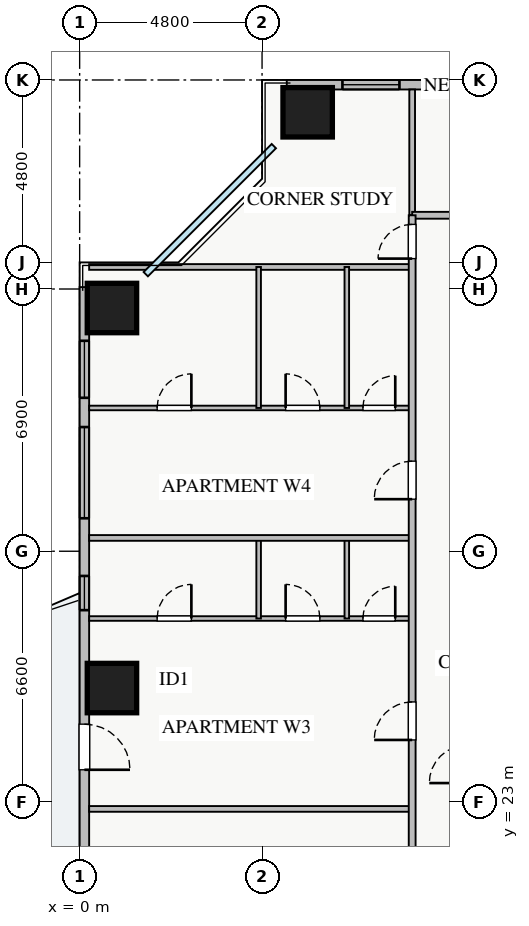
"""IFC4 building model, lengths in metres.
Left out: names, types, materials, properties, quantities, classifications, styles, units other than length and angle.
Written with IfcOpenShell. Run it as: python <this file> out.ifc"""

import sys

from ifc_helpers import new_model, si_unit, direction, frame, frame_2d, origin, origin_2d, place, context, subcontext, project, spatial, rectangle, extrude, source, transform, mapped, element, fill, save


model = new_model("IFC4")
c1 = context("Model", 3, precision=1e-05, world=origin(), true_north=direction((0.0, 1.0)))
c2 = subcontext(c1, "Body", "Model", "MODEL_VIEW")
j1 = project(units=[si_unit("LENGTHUNIT", "METRE"), si_unit("PLANEANGLEUNIT", "RADIAN")], contexts=[c1])
p1 = place(None, origin())
s1 = spatial("IfcSite", under=j1, at=p1, CompositionType="ELEMENT")
p2 = place(p1, origin())
s2 = spatial("IfcBuilding", under=s1, at=p2, CompositionType="ELEMENT")
p3 = place(p2, frame((0.0, 0.0, 63.25)))
s3 = spatial("IfcBuildingStorey", under=s2, at=p3, CompositionType="ELEMENT", Elevation=63.25)
m1 = source(origin(), c2, "Body", "SweptSolid", [
    extrude(rectangle(XDim=1.3, YDim=1.3, at=origin_2d()), origin(), (0.0, 0.0, 1.0), 3.25),
])
for number, where, z_axis, x_axis in (
    (1, (6.0, 41.15, 0.0), (0.0, 0.0, 1.0), (1.0, 0.0, 0.0)),
    (2, (0.85, 36.0, 0.0), (0.0, 0.0, 1.0), (1.0, 0.0, 0.0)),
    (3, (0.85, 26.0, 0.0), (0.0, 0.0, 1.0), (1.0, 0.0, 0.0)),
):
    element("IfcColumn", number, at=place(p3, frame(where, z_axis=z_axis, x_axis=x_axis)), inside=s3, PredefinedType="COLUMN", context=c2, shape_type="MappedRepresentation", body=[
        mapped(m1, transform((0.0, 0.0, 0.0), x_axis=(1.0, 0.0, 0.0), y_axis=(0.0, 1.0, 0.0), z_axis=(0.0, 0.0, 1.0), scale=1.0)),
    ])
p4 = place(p3, frame((5.45, 41.875, 0.0), z_axis=(0.0, 0.0, 1.0), x_axis=(1.0, 0.0, 0.0)))
e4 = element("IfcWall", 4, at=p4, inside=s3, PredefinedType="STANDARD", context=c2, shape_type="SweptSolid", body=[
    extrude(rectangle(XDim=27.1, YDim=0.25, at=frame_2d((13.55, 0.0))), origin(), (0.0, 0.0, 1.0), 2.61),
])
p5 = place(p4, frame((14.4, 0.0, 0.0)))
e5 = element("IfcOpeningElement", 5, at=p5, cuts=e4, PredefinedType="OPENING", context=c2, shape_type="SweptSolid", body=[
    extrude(rectangle(XDim=1.2, YDim=2.1, at=frame_2d((0.6, 1.05))), frame((0.0, 0.135, 0.0), z_axis=(0.0, -1.0, 0.0), x_axis=(1.0, 0.0, 0.0)), (0.0, 0.0, 1.0), 0.27),
])
p6 = place(p4, frame((1.465, 0.0, 0.9)))
e6 = element("IfcOpeningElement", 6, at=p6, cuts=e4, PredefinedType="OPENING", context=c2, shape_type="SweptSolid", body=[
    extrude(rectangle(XDim=1.5, YDim=1.5, at=frame_2d((0.75, 0.75))), frame((0.0, 0.135, 0.0), z_axis=(0.0, -1.0, 0.0), x_axis=(1.0, 0.0, 0.0)), (0.0, 0.0, 1.0), 0.27),
])
p7 = place(p4, frame((9.263, 0.0, 0.9)))
e7 = element("IfcOpeningElement", 7, at=p7, cuts=e4, PredefinedType="OPENING", context=c2, shape_type="SweptSolid", body=[
    extrude(rectangle(XDim=1.8, YDim=1.45, at=frame_2d((0.9, 0.725))), frame((0.0, 0.135, 0.0), z_axis=(0.0, -1.0, 0.0), x_axis=(1.0, 0.0, 0.0)), (0.0, 0.0, 1.0), 0.27),
])
p8 = place(p4, frame((17.93, 0.0, 0.9)))
e8 = element("IfcOpeningElement", 8, at=p8, cuts=e4, PredefinedType="OPENING", context=c2, shape_type="SweptSolid", body=[
    extrude(rectangle(XDim=1.5, YDim=1.5, at=frame_2d((0.75, 0.75))), frame((0.0, 0.135, 0.0), z_axis=(0.0, -1.0, 0.0), x_axis=(1.0, 0.0, 0.0)), (0.0, 0.0, 1.0), 0.27),
])
p9 = place(p4, frame((22.663, 0.0, 0.9)))
e9 = element("IfcOpeningElement", 9, at=p9, cuts=e4, PredefinedType="OPENING", context=c2, shape_type="SweptSolid", body=[
    extrude(rectangle(XDim=2.1, YDim=1.48, at=frame_2d((1.05, 0.74))), frame((0.0, 0.135, 0.0), z_axis=(0.0, -1.0, 0.0), x_axis=(1.0, 0.0, 0.0)), (0.0, 0.0, 1.0), 0.27),
])
p10 = place(p4, frame((4.63, 0.0, 0.9)))
e10 = element("IfcOpeningElement", 10, at=p10, cuts=e4, PredefinedType="OPENING", context=c2, shape_type="SweptSolid", body=[
    extrude(rectangle(XDim=2.4, YDim=1.5, at=frame_2d((1.2, 0.75))), frame((0.0, 0.135, 0.0), z_axis=(0.0, -1.0, 0.0), x_axis=(1.0, 0.0, 0.0)), (0.0, 0.0, 1.0), 0.27),
])
p11 = place(p3, frame((0.125, 9.45, 0.0), z_axis=(0.0, 0.0, 1.0), x_axis=(0.0, 1.0, 0.0)))
e11 = element("IfcWall", 11, at=p11, inside=s3, PredefinedType="STANDARD", context=c2, shape_type="SweptSolid", body=[
    extrude(rectangle(XDim=27.1, YDim=0.25, at=frame_2d((13.55, 0.0))), origin(), (0.0, 0.0, 1.0), 2.61),
])
p12 = place(p11, frame((14.4, 0.0, 0.0)))
e12 = element("IfcOpeningElement", 12, at=p12, cuts=e11, PredefinedType="OPENING", context=c2, shape_type="SweptSolid", body=[
    extrude(rectangle(XDim=1.2, YDim=2.1, at=frame_2d((0.6, 1.05))), frame((0.0, 0.135, 0.0), z_axis=(0.0, -1.0, 0.0), x_axis=(1.0, 0.0, 0.0)), (0.0, 0.0, 1.0), 0.27),
])
p13 = place(p11, frame((1.417, 0.0, 0.9)))
e13 = element("IfcOpeningElement", 13, at=p13, cuts=e11, PredefinedType="OPENING", context=c2, shape_type="SweptSolid", body=[
    extrude(rectangle(XDim=1.2, YDim=1.4, at=frame_2d((0.6, 0.7))), frame((0.0, 0.135, 0.0), z_axis=(0.0, -1.0, 0.0), x_axis=(1.0, 0.0, 0.0)), (0.0, 0.0, 1.0), 0.27),
])
p14 = place(p11, frame((24.188, 0.0, 0.9)))
e14 = element("IfcOpeningElement", 14, at=p14, cuts=e11, PredefinedType="OPENING", context=c2, shape_type="SweptSolid", body=[
    extrude(rectangle(XDim=1.5, YDim=1.5, at=frame_2d((0.75, 0.75))), frame((0.0, 0.135, 0.0), z_axis=(0.0, -1.0, 0.0), x_axis=(1.0, 0.0, 0.0)), (0.0, 0.0, 1.0), 0.27),
])
p15 = place(p11, frame((3.722, 0.0, 0.9)))
e15 = element("IfcOpeningElement", 15, at=p15, cuts=e11, PredefinedType="OPENING", context=c2, shape_type="SweptSolid", body=[
    extrude(rectangle(XDim=2.4, YDim=1.5, at=frame_2d((1.2, 0.75))), frame((0.0, 0.135, 0.0), z_axis=(0.0, -1.0, 0.0), x_axis=(1.0, 0.0, 0.0)), (0.0, 0.0, 1.0), 0.27),
])
p16 = place(p11, frame((21.018, 0.0, 0.9)))
e16 = element("IfcOpeningElement", 16, at=p16, cuts=e11, PredefinedType="OPENING", context=c2, shape_type="SweptSolid", body=[
    extrude(rectangle(XDim=2.4, YDim=1.5, at=frame_2d((1.2, 0.75))), frame((0.0, 0.135, 0.0), z_axis=(0.0, -1.0, 0.0), x_axis=(1.0, 0.0, 0.0)), (0.0, 0.0, 1.0), 0.27),
])
p17 = place(p11, frame((18.6, 0.0, 0.9)))
e17 = element("IfcOpeningElement", 17, at=p17, cuts=e11, PredefinedType="OPENING", context=c2, shape_type="SweptSolid", body=[
    extrude(rectangle(XDim=0.9, YDim=1.2, at=frame_2d((0.45, 0.6))), frame((0.0, 0.135, 0.0), z_axis=(0.0, -1.0, 0.0), x_axis=(1.0, 0.0, 0.0)), (0.0, 0.0, 1.0), 0.27),
])
p18 = place(p3, frame((8.75, 38.44, 0.0), z_axis=(0.0, 0.0, 1.0), x_axis=(0.0, 1.0, 0.0)))
e18 = element("IfcWall", 18, at=p18, inside=s3, PredefinedType="PARTITIONING", context=c2, shape_type="SweptSolid", body=[
    extrude(rectangle(XDim=3.31, YDim=0.15, at=frame_2d((1.655, 0.0))), origin(), (0.0, 0.0, 1.0), 3.07),
])
p19 = place(p3, frame((8.75, 38.44, 0.0), z_axis=(0.0, 0.0, 1.0), x_axis=(1.0, 0.0, 0.0)))
e19 = element("IfcWall", 19, at=p19, inside=s3, PredefinedType="PARTITIONING", context=c2, shape_type="SweptSolid", body=[
    extrude(rectangle(XDim=23.61, YDim=0.18, at=frame_2d((11.805, 0.0))), origin(), (0.0, 0.0, 1.0), 3.07),
])
p20 = place(p19, frame((2.03, 0.0, 0.0)))
e20 = element("IfcOpeningElement", 20, at=p20, cuts=e19, PredefinedType="OPENING", context=c2, shape_type="SweptSolid", body=[
    extrude(rectangle(XDim=1.0, YDim=2.05, at=frame_2d((0.5, 1.025))), frame((0.0, 0.1, 0.0), z_axis=(0.0, -1.0, 0.0), x_axis=(1.0, 0.0, 0.0)), (0.0, 0.0, 1.0), 0.2),
])
p21 = place(p19, frame((8.555, 0.0, 0.0)))
e21 = element("IfcOpeningElement", 21, at=p21, cuts=e19, PredefinedType="OPENING", context=c2, shape_type="SweptSolid", body=[
    extrude(rectangle(XDim=1.0, YDim=2.05, at=frame_2d((0.5, 1.025))), frame((0.0, 0.1, 0.0), z_axis=(0.0, -1.0, 0.0), x_axis=(1.0, 0.0, 0.0)), (0.0, 0.0, 1.0), 0.2),
])
p22 = place(p19, frame((14.88, 0.0, 0.0)))
e22 = element("IfcOpeningElement", 22, at=p22, cuts=e19, PredefinedType="OPENING", context=c2, shape_type="SweptSolid", body=[
    extrude(rectangle(XDim=1.0, YDim=2.05, at=frame_2d((0.5, 1.025))), frame((0.0, 0.1, 0.0), z_axis=(0.0, -1.0, 0.0), x_axis=(1.0, 0.0, 0.0)), (0.0, 0.0, 1.0), 0.2),
])
p23 = place(p19, frame((20.16, 0.0, 0.0)))
e23 = element("IfcOpeningElement", 23, at=p23, cuts=e19, PredefinedType="OPENING", context=c2, shape_type="SweptSolid", body=[
    extrude(rectangle(XDim=1.0, YDim=2.05, at=frame_2d((0.5, 1.025))), frame((0.0, 0.1, 0.0), z_axis=(0.0, -1.0, 0.0), x_axis=(1.0, 0.0, 0.0)), (0.0, 0.0, 1.0), 0.2),
])
p24 = place(p3, frame((0.25, 37.08, 0.0), z_axis=(0.0, 0.0, 1.0), x_axis=(1.0, 0.0, 0.0)))
e24 = element("IfcWall", 24, at=p24, inside=s3, PredefinedType="PARTITIONING", context=c2, shape_type="SweptSolid", body=[
    extrude(rectangle(XDim=8.5, YDim=0.15, at=frame_2d((4.25, 0.0))), origin(), (0.0, 0.0, 1.0), 3.07),
])
p25 = place(p3, frame((0.25, 27.83, 0.0), z_axis=(0.0, 0.0, 1.0), x_axis=(1.0, 0.0, 0.0)))
e25 = element("IfcWall", 25, at=p25, inside=s3, PredefinedType="PLUMBINGWALL", context=c2, shape_type="SweptSolid", body=[
    extrude(rectangle(XDim=8.5, YDim=0.12, at=frame_2d((4.25, 0.0))), origin(), (0.0, 0.0, 1.0), 2.771),
])
p26 = place(p25, frame((1.79, 0.0, 0.0)))
e26 = element("IfcOpeningElement", 26, at=p26, cuts=e25, PredefinedType="OPENING", context=c2, shape_type="SweptSolid", body=[
    extrude(rectangle(XDim=0.9, YDim=2.05, at=frame_2d((0.45, 1.025))), frame((0.0, 0.07, 0.0), z_axis=(0.0, -1.0, 0.0), x_axis=(1.0, 0.0, 0.0)), (0.0, 0.0, 1.0), 0.14),
])
p27 = place(p25, frame((5.17, 0.0, 0.0)))
e27 = element("IfcOpeningElement", 27, at=p27, cuts=e25, PredefinedType="OPENING", context=c2, shape_type="SweptSolid", body=[
    extrude(rectangle(XDim=0.9, YDim=2.05, at=frame_2d((0.45, 1.025))), frame((0.0, 0.07, 0.0), z_axis=(0.0, -1.0, 0.0), x_axis=(1.0, 0.0, 0.0)), (0.0, 0.0, 1.0), 0.14),
])
p28 = place(p25, frame((7.205, 0.0, 0.0)))
e28 = element("IfcOpeningElement", 28, at=p28, cuts=e25, PredefinedType="OPENING", context=c2, shape_type="SweptSolid", body=[
    extrude(rectangle(XDim=0.85, YDim=2.05, at=frame_2d((0.425, 1.025))), frame((0.0, 0.07, 0.0), z_axis=(0.0, -1.0, 0.0), x_axis=(1.0, 0.0, 0.0)), (0.0, 0.0, 1.0), 0.14),
])
for number, where, z_axis, x_axis in (
    (29, (4.71, 27.83, 0.0), (0.0, 0.0, 1.0), (0.0, 1.0, 0.0)),
    (30, (7.03, 27.83, 0.0), (0.0, 0.0, 1.0), (0.0, 1.0, 0.0)),
):
    element("IfcWall", number, at=place(p3, frame(where, z_axis=z_axis, x_axis=x_axis)), inside=s3, PredefinedType="PLUMBINGWALL", context=c2, shape_type="SweptSolid", body=[
        extrude(rectangle(XDim=2.12, YDim=0.12, at=frame_2d((1.06, 0.0))), origin(), (0.0, 0.0, 1.0), 3.07),
    ])
p29 = place(p3, frame((0.25, 22.82, 0.0), z_axis=(0.0, 0.0, 1.0), x_axis=(1.0, 0.0, 0.0)))
e31 = element("IfcWall", 31, at=p29, inside=s3, PredefinedType="PARTITIONING", context=c2, shape_type="SweptSolid", body=[
    extrude(rectangle(XDim=8.5, YDim=0.15, at=frame_2d((4.25, 0.0))), origin(), (0.0, 0.0, 1.0), 3.07),
])
p30 = place(p3, frame((0.25, 33.37, 0.0), z_axis=(0.0, 0.0, 1.0), x_axis=(1.0, 0.0, 0.0)))
e32 = element("IfcWall", 32, at=p30, inside=s3, PredefinedType="PLUMBINGWALL", context=c2, shape_type="SweptSolid", body=[
    extrude(rectangle(XDim=8.5, YDim=0.12, at=frame_2d((4.25, 0.0))), origin(), (0.0, 0.0, 1.0), 3.07),
])
p31 = place(p30, frame((1.79, 0.0, 0.0)))
e33 = element("IfcOpeningElement", 33, at=p31, cuts=e32, PredefinedType="OPENING", context=c2, shape_type="SweptSolid", body=[
    extrude(rectangle(XDim=0.9, YDim=2.05, at=frame_2d((0.45, 1.025))), frame((0.0, 0.07, 0.0), z_axis=(0.0, -1.0, 0.0), x_axis=(1.0, 0.0, 0.0)), (0.0, 0.0, 1.0), 0.14),
])
p32 = place(p30, frame((5.17, 0.0, 0.0)))
e34 = element("IfcOpeningElement", 34, at=p32, cuts=e32, PredefinedType="OPENING", context=c2, shape_type="SweptSolid", body=[
    extrude(rectangle(XDim=0.9, YDim=2.05, at=frame_2d((0.45, 1.025))), frame((0.0, 0.07, 0.0), z_axis=(0.0, -1.0, 0.0), x_axis=(1.0, 0.0, 0.0)), (0.0, 0.0, 1.0), 0.14),
])
p33 = place(p30, frame((7.205, 0.0, 0.0)))
e35 = element("IfcOpeningElement", 35, at=p33, cuts=e32, PredefinedType="OPENING", context=c2, shape_type="SweptSolid", body=[
    extrude(rectangle(XDim=0.85, YDim=2.05, at=frame_2d((0.425, 1.025))), frame((0.0, 0.07, 0.0), z_axis=(0.0, -1.0, 0.0), x_axis=(1.0, 0.0, 0.0)), (0.0, 0.0, 1.0), 0.14),
])
for number, where, z_axis, x_axis in (
    (36, (4.71, 33.37, 0.0), (0.0, 0.0, 1.0), (0.0, 1.0, 0.0)),
    (37, (7.03, 33.37, 0.0), (0.0, 0.0, 1.0), (0.0, 1.0, 0.0)),
):
    element("IfcWall", number, at=place(p3, frame(where, z_axis=z_axis, x_axis=x_axis)), inside=s3, PredefinedType="PLUMBINGWALL", context=c2, shape_type="SweptSolid", body=[
        extrude(rectangle(XDim=3.71, YDim=0.12, at=frame_2d((1.855, 0.0))), origin(), (0.0, 0.0, 1.0), 3.07),
    ])
p34 = place(p3, frame((0.25, 29.95, 0.0), z_axis=(0.0, 0.0, 1.0), x_axis=(1.0, 0.0, 0.0)))
e38 = element("IfcWall", 38, at=p34, inside=s3, PredefinedType="PARTITIONING", context=c2, shape_type="SweptSolid", body=[
    extrude(rectangle(XDim=8.5, YDim=0.15, at=frame_2d((4.25, 0.0))), origin(), (0.0, 0.0, 1.0), 3.07),
])
p35 = place(p3, frame((8.75, 7.21, 0.0), z_axis=(0.0, 0.0, 1.0), x_axis=(0.0, 1.0, 0.0)))
e39 = element("IfcWall", 39, at=p35, inside=s3, PredefinedType="PARTITIONING", context=c2, shape_type="SweptSolid", body=[
    extrude(rectangle(XDim=31.23, YDim=0.18, at=frame_2d((15.615, 0.0))), origin(), (0.0, 0.0, 1.0), 3.07),
])
p36 = place(p35, frame((30.09, 0.0, 0.0)))
e40 = element("IfcOpeningElement", 40, at=p36, cuts=e39, PredefinedType="OPENING", context=c2, shape_type="SweptSolid", body=[
    extrude(rectangle(XDim=0.9, YDim=2.05, at=frame_2d((0.45, 1.025))), frame((0.0, 0.1, 0.0), z_axis=(0.0, -1.0, 0.0), x_axis=(1.0, 0.0, 0.0)), (0.0, 0.0, 1.0), 0.2),
])
p37 = place(p35, frame((0.24, 0.0, 0.0)))
e41 = element("IfcOpeningElement", 41, at=p37, cuts=e39, PredefinedType="OPENING", context=c2, shape_type="SweptSolid", body=[
    extrude(rectangle(XDim=0.9, YDim=2.05, at=frame_2d((0.45, 1.025))), frame((0.0, 0.1, 0.0), z_axis=(0.0, -1.0, 0.0), x_axis=(1.0, 0.0, 0.0)), (0.0, 0.0, 1.0), 0.2),
])
p38 = place(p35, frame((2.555, 0.0, 0.0)))
e42 = element("IfcOpeningElement", 42, at=p38, cuts=e39, PredefinedType="OPENING", context=c2, shape_type="SweptSolid", body=[
    extrude(rectangle(XDim=1.0, YDim=2.05, at=frame_2d((0.5, 1.025))), frame((0.0, 0.1, 0.0), z_axis=(0.0, -1.0, 0.0), x_axis=(1.0, 0.0, 0.0)), (0.0, 0.0, 1.0), 0.2),
])
p39 = place(p35, frame((11.91, 0.0, 0.0)))
e43 = element("IfcOpeningElement", 43, at=p39, cuts=e39, PredefinedType="OPENING", context=c2, shape_type="SweptSolid", body=[
    extrude(rectangle(XDim=1.0, YDim=2.05, at=frame_2d((0.5, 1.025))), frame((0.0, 0.1, 0.0), z_axis=(0.0, -1.0, 0.0), x_axis=(1.0, 0.0, 0.0)), (0.0, 0.0, 1.0), 0.2),
])
p40 = place(p35, frame((17.425, 0.0, 0.0)))
e44 = element("IfcOpeningElement", 44, at=p40, cuts=e39, PredefinedType="OPENING", context=c2, shape_type="SweptSolid", body=[
    extrude(rectangle(XDim=1.0, YDim=2.05, at=frame_2d((0.5, 1.025))), frame((0.0, 0.1, 0.0), z_axis=(0.0, -1.0, 0.0), x_axis=(1.0, 0.0, 0.0)), (0.0, 0.0, 1.0), 0.2),
])
p41 = place(p35, frame((23.76, 0.0, 0.0)))
e45 = element("IfcOpeningElement", 45, at=p41, cuts=e39, PredefinedType="OPENING", context=c2, shape_type="SweptSolid", body=[
    extrude(rectangle(XDim=1.0, YDim=2.05, at=frame_2d((0.5, 1.025))), frame((0.0, 0.1, 0.0), z_axis=(0.0, -1.0, 0.0), x_axis=(1.0, 0.0, 0.0)), (0.0, 0.0, 1.0), 0.2),
])
m2 = source(origin(), c2, "Body", "SweptSolid", [
    extrude(rectangle(XDim=1.5, YDim=1.5, at=frame_2d((0.75, 0.75))), frame((0.0, 0.03, 0.0), z_axis=(0.0, -1.0, 0.0), x_axis=(1.0, 0.0, 0.0)), (0.0, 0.0, 1.0), 0.06),
])
p42 = place(p6, origin())
e46 = element("IfcWindow", 46, at=p42, inside=s3, PartitioningType="TRIPLE_PANEL_VERTICAL", PredefinedType="WINDOW", context=c2, shape_type="MappedRepresentation", body=[
    mapped(m2, transform((0.0, 0.0, 0.0), x_axis=(1.0, 0.0, 0.0), y_axis=(0.0, 1.0, 0.0), z_axis=(0.0, 0.0, 1.0), scale=1.0)),
])
fill(e6, e46)
m3 = source(origin(), c2, "Body", "SweptSolid", [
    extrude(rectangle(XDim=1.2, YDim=2.1, at=frame_2d((0.6, 1.05))), frame((0.0, 0.025, 0.0), z_axis=(0.0, -1.0, 0.0), x_axis=(1.0, 0.0, 0.0)), (0.0, 0.0, 1.0), 0.05),
])
p43 = place(p12, frame((1.2, 0.0, 0.0), z_axis=(0.0, 0.0, 1.0), x_axis=(-1.0, 0.0, 0.0)))
e47 = element("IfcDoor", 47, at=p43, inside=s3, OperationType="SINGLE_SWING_LEFT", PredefinedType="DOOR", context=c2, shape_type="MappedRepresentation", body=[
    mapped(m3, transform((0.0, 0.0, 0.0), x_axis=(1.0, 0.0, 0.0), y_axis=(0.0, 1.0, 0.0), z_axis=(0.0, 0.0, 1.0), scale=1.0)),
])
fill(e12, e47)
p44 = place(p14, origin())
e48 = element("IfcWindow", 48, at=p44, inside=s3, PartitioningType="TRIPLE_PANEL_VERTICAL", PredefinedType="WINDOW", context=c2, shape_type="MappedRepresentation", body=[
    mapped(m2, transform((0.0, 0.0, 0.0), x_axis=(1.0, 0.0, 0.0), y_axis=(0.0, 1.0, 0.0), z_axis=(0.0, 0.0, 1.0), scale=1.0)),
])
fill(e14, e48)
m4 = source(origin(), c2, "Body", "SweptSolid", [
    extrude(rectangle(XDim=0.9, YDim=2.05, at=frame_2d((0.45, 1.025))), frame((0.0, 0.025, 0.0), z_axis=(0.0, -1.0, 0.0), x_axis=(1.0, 0.0, 0.0)), (0.0, 0.0, 1.0), 0.05),
])
p45 = place(p26, origin())
e49 = element("IfcDoor", 49, at=p45, inside=s3, OperationType="SINGLE_SWING_RIGHT", PredefinedType="DOOR", context=c2, shape_type="MappedRepresentation", body=[
    mapped(m4, transform((0.0, 0.0, 0.0), x_axis=(1.0, 0.0, 0.0), y_axis=(0.0, 1.0, 0.0), z_axis=(0.0, 0.0, 1.0), scale=1.0)),
])
fill(e26, e49)
p46 = place(p27, origin())
e50 = element("IfcDoor", 50, at=p46, inside=s3, OperationType="SINGLE_SWING_LEFT", PredefinedType="DOOR", context=c2, shape_type="MappedRepresentation", body=[
    mapped(m4, transform((0.0, 0.0, 0.0), x_axis=(1.0, 0.0, 0.0), y_axis=(0.0, 1.0, 0.0), z_axis=(0.0, 0.0, 1.0), scale=1.0)),
])
fill(e27, e50)
m5 = source(origin(), c2, "Body", "SweptSolid", [
    extrude(rectangle(XDim=0.85, YDim=2.05, at=frame_2d((0.425, 1.025))), frame((0.0, 0.025, 0.0), z_axis=(0.0, -1.0, 0.0), x_axis=(1.0, 0.0, 0.0)), (0.0, 0.0, 1.0), 0.05),
])
p47 = place(p28, origin())
e51 = element("IfcDoor", 51, at=p47, inside=s3, OperationType="SINGLE_SWING_RIGHT", PredefinedType="DOOR", context=c2, shape_type="MappedRepresentation", body=[
    mapped(m5, transform((0.0, 0.0, 0.0), x_axis=(1.0, 0.0, 0.0), y_axis=(0.0, 1.0, 0.0), z_axis=(0.0, 0.0, 1.0), scale=1.0)),
])
fill(e28, e51)
p48 = place(p31, origin())
e52 = element("IfcDoor", 52, at=p48, inside=s3, OperationType="SINGLE_SWING_RIGHT", PredefinedType="DOOR", context=c2, shape_type="MappedRepresentation", body=[
    mapped(m4, transform((0.0, 0.0, 0.0), x_axis=(1.0, 0.0, 0.0), y_axis=(0.0, 1.0, 0.0), z_axis=(0.0, 0.0, 1.0), scale=1.0)),
])
fill(e33, e52)
p49 = place(p32, origin())
e53 = element("IfcDoor", 53, at=p49, inside=s3, OperationType="SINGLE_SWING_LEFT", PredefinedType="DOOR", context=c2, shape_type="MappedRepresentation", body=[
    mapped(m4, transform((0.0, 0.0, 0.0), x_axis=(1.0, 0.0, 0.0), y_axis=(0.0, 1.0, 0.0), z_axis=(0.0, 0.0, 1.0), scale=1.0)),
])
fill(e34, e53)
p50 = place(p33, origin())
e54 = element("IfcDoor", 54, at=p50, inside=s3, OperationType="SINGLE_SWING_RIGHT", PredefinedType="DOOR", context=c2, shape_type="MappedRepresentation", body=[
    mapped(m5, transform((0.0, 0.0, 0.0), x_axis=(1.0, 0.0, 0.0), y_axis=(0.0, 1.0, 0.0), z_axis=(0.0, 0.0, 1.0), scale=1.0)),
])
fill(e35, e54)
p51 = place(p36, origin())
e55 = element("IfcDoor", 55, at=p51, inside=s3, OperationType="SINGLE_SWING_LEFT", PredefinedType="DOOR", context=c2, shape_type="MappedRepresentation", body=[
    mapped(m4, transform((0.0, 0.0, 0.0), x_axis=(1.0, 0.0, 0.0), y_axis=(0.0, 1.0, 0.0), z_axis=(0.0, 0.0, 1.0), scale=1.0)),
])
fill(e40, e55)
m6 = source(origin(), c2, "Body", "SweptSolid", [
    extrude(rectangle(XDim=1.0, YDim=2.05, at=frame_2d((0.5, 1.025))), frame((0.0, 0.025, 0.0), z_axis=(0.0, -1.0, 0.0), x_axis=(1.0, 0.0, 0.0)), (0.0, 0.0, 1.0), 0.05),
])
p52 = place(p40, origin())
e56 = element("IfcDoor", 56, at=p52, inside=s3, OperationType="SINGLE_SWING_LEFT", PredefinedType="DOOR", context=c2, shape_type="MappedRepresentation", body=[
    mapped(m6, transform((0.0, 0.0, 0.0), x_axis=(1.0, 0.0, 0.0), y_axis=(0.0, 1.0, 0.0), z_axis=(0.0, 0.0, 1.0), scale=1.0)),
])
fill(e44, e56)
p53 = place(p41, origin())
e57 = element("IfcDoor", 57, at=p53, inside=s3, OperationType="SINGLE_SWING_LEFT", PredefinedType="DOOR", context=c2, shape_type="MappedRepresentation", body=[
    mapped(m6, transform((0.0, 0.0, 0.0), x_axis=(1.0, 0.0, 0.0), y_axis=(0.0, 1.0, 0.0), z_axis=(0.0, 0.0, 1.0), scale=1.0)),
])
fill(e45, e57)
m7 = source(origin(), c2, "Body", "SweptSolid", [
    extrude(rectangle(XDim=2.4, YDim=1.5, at=frame_2d((1.2, 0.75))), frame((0.0, 0.03, 0.0), z_axis=(0.0, -1.0, 0.0), x_axis=(1.0, 0.0, 0.0)), (0.0, 0.0, 1.0), 0.06),
])
p54 = place(p16, origin())
e58 = element("IfcWindow", 58, at=p54, inside=s3, PartitioningType="TRIPLE_PANEL_VERTICAL", PredefinedType="WINDOW", context=c2, shape_type="MappedRepresentation", body=[
    mapped(m7, transform((0.0, 0.0, 0.0), x_axis=(1.0, 0.0, 0.0), y_axis=(0.0, 1.0, 0.0), z_axis=(0.0, 0.0, 1.0), scale=1.0)),
])
fill(e16, e58)
m8 = source(origin(), c2, "Body", "SweptSolid", [
    extrude(rectangle(XDim=0.9, YDim=1.2, at=frame_2d((0.45, 0.6))), frame((0.0, 0.03, 0.0), z_axis=(0.0, -1.0, 0.0), x_axis=(1.0, 0.0, 0.0)), (0.0, 0.0, 1.0), 0.06),
])
p55 = place(p17, origin())
e59 = element("IfcWindow", 59, at=p55, inside=s3, PartitioningType="SINGLE_PANEL", PredefinedType="WINDOW", context=c2, shape_type="MappedRepresentation", body=[
    mapped(m8, transform((0.0, 0.0, 0.0), x_axis=(1.0, 0.0, 0.0), y_axis=(0.0, 1.0, 0.0), z_axis=(0.0, 0.0, 1.0), scale=1.0)),
])
fill(e17, e59)
save(model, sys.argv[1])
